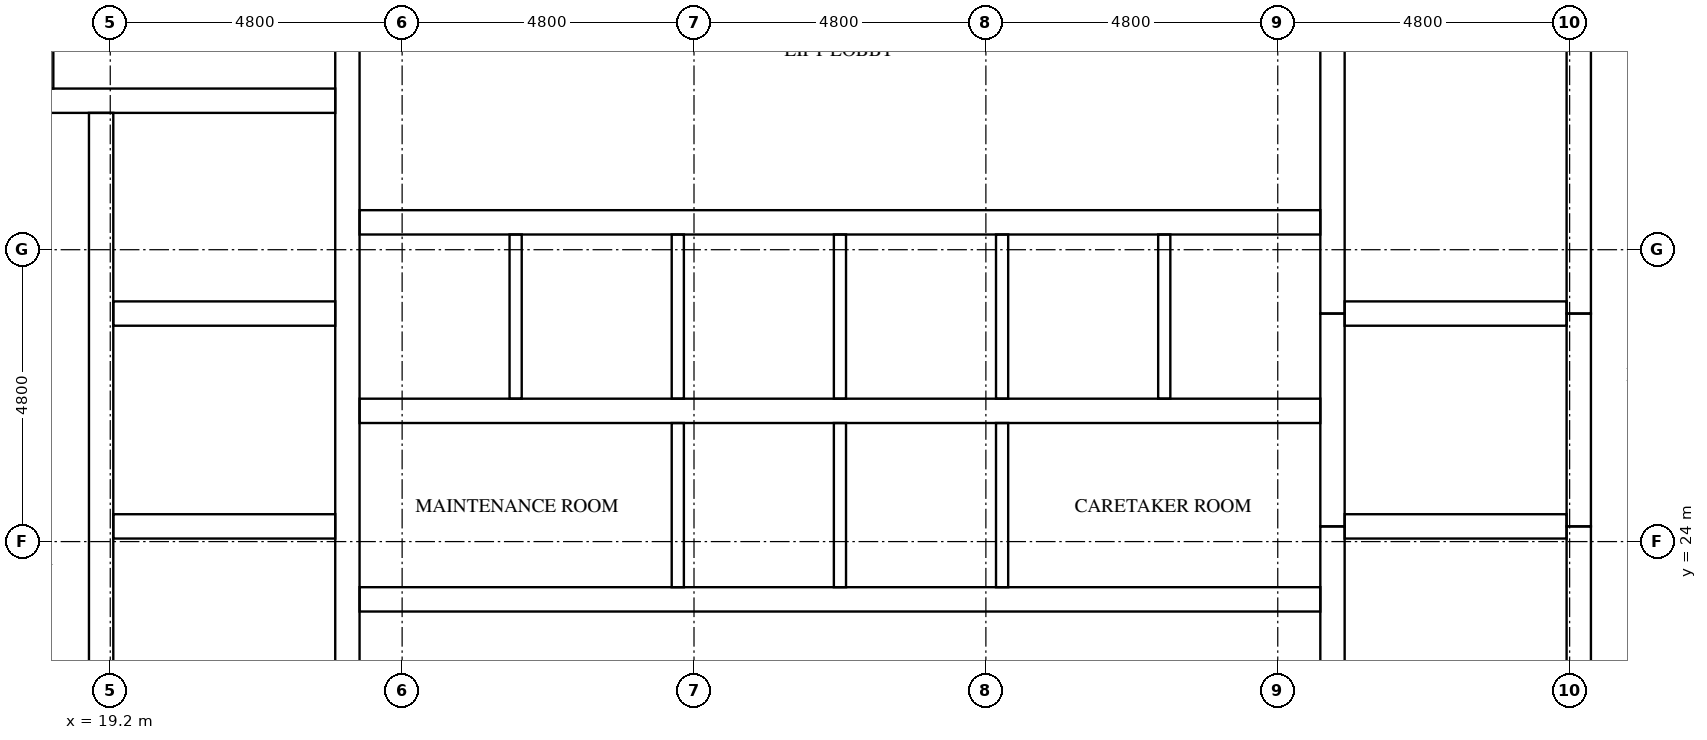
"""IFC4 building model, lengths in metres.
Left out: names, types, materials, properties, quantities, classifications, styles, units other than length and angle.
Written with IfcOpenShell. Run it as: python <this file> out.ifc"""

import sys

from ifc_helpers import new_model, si_unit, direction, frame, frame_2d, origin, place, context, subcontext, project, spatial, rectangle, extrude, element, fill, save


model = new_model("IFC4")
c1 = context("Model", 3, precision=1e-05, world=origin(), true_north=direction((0.0, 1.0)))
c2 = subcontext(c1, "Body", "Model", "MODEL_VIEW")
j1 = project(units=[si_unit("LENGTHUNIT", "METRE"), si_unit("PLANEANGLEUNIT", "RADIAN")], contexts=[c1])
p1 = place(None, origin())
s1 = spatial("IfcSite", under=j1, at=p1, CompositionType="ELEMENT")
p2 = place(p1, origin())
s2 = spatial("IfcBuilding", under=s1, at=p2, CompositionType="ELEMENT")
p3 = place(p2, frame((0.0, 0.0, 275.6)))
s3 = spatial("IfcBuildingStorey", under=s2, at=p3, CompositionType="ELEMENT", Elevation=275.6)
p4 = place(p3, frame((19.05, 15.5, 0.0), z_axis=(0.0, 0.0, 1.0), x_axis=(0.0, 1.0, 0.0)))
e1 = element("IfcWall", 1, at=p4, inside=s3, PredefinedType="SHEAR", context=c2, shape_type="SweptSolid", body=[
    extrude(rectangle(XDim=15.55, YDim=0.4, at=frame_2d((7.775, 0.0))), origin(), (0.0, 0.0, 1.0), 3.2),
])
p5 = place(p4, frame((9.95, 0.0, 0.0)))
e2 = element("IfcOpeningElement", 2, at=p5, cuts=e1, PredefinedType="OPENING", context=c2, shape_type="SweptSolid", body=[
    extrude(rectangle(XDim=1.1, YDim=2.1, at=frame_2d((0.55, 1.05))), frame((0.0, 0.21, 0.0), z_axis=(0.0, -1.0, 0.0), x_axis=(1.0, 0.0, 0.0)), (0.0, 0.0, 1.0), 0.42),
])
p6 = place(p4, frame((13.45, 0.0, 0.0)))
e3 = element("IfcOpeningElement", 3, at=p6, cuts=e1, PredefinedType="OPENING", context=c2, shape_type="SweptSolid", body=[
    extrude(rectangle(XDim=1.1, YDim=2.1, at=frame_2d((0.55, 1.05))), frame((0.0, 0.21, 0.0), z_axis=(0.0, -1.0, 0.0), x_axis=(1.0, 0.0, 0.0)), (0.0, 0.0, 1.0), 0.42),
])
p7 = place(p4, frame((0.7, 0.0, 0.0)))
e4 = element("IfcOpeningElement", 4, at=p7, cuts=e1, PredefinedType="OPENING", context=c2, shape_type="SweptSolid", body=[
    extrude(rectangle(XDim=1.2, YDim=2.1, at=frame_2d((0.6, 1.05))), frame((0.0, 0.21, 0.0), z_axis=(0.0, -1.0, 0.0), x_axis=(1.0, 0.0, 0.0)), (0.0, 0.0, 1.0), 0.42),
])
p8 = place(p3, frame((23.1, 15.5, 0.0), z_axis=(0.0, 0.0, 1.0), x_axis=(0.0, 1.0, 0.0)))
e5 = element("IfcWall", 5, at=p8, inside=s3, PredefinedType="SHEAR", context=c2, shape_type="SweptSolid", body=[
    extrude(rectangle(XDim=21.8, YDim=0.4, at=frame_2d((10.9, 0.0))), origin(), (0.0, 0.0, 1.0), 3.2),
])
p9 = place(p3, frame((39.3, 15.5, 0.0), z_axis=(0.0, 0.0, 1.0), x_axis=(0.0, 1.0, 0.0)))
e6 = element("IfcWall", 6, at=p9, inside=s3, PredefinedType="SHEAR", context=c2, shape_type="SweptSolid", body=[
    extrude(rectangle(XDim=8.75, YDim=0.4, at=frame_2d((4.375, 0.0))), origin(), (0.0, 0.0, 1.0), 3.2),
])
p10 = place(p3, frame((39.3, 24.25, 0.0), z_axis=(0.0, 0.0, 1.0), x_axis=(0.0, 1.0, 0.0)))
e7 = element("IfcWall", 7, at=p10, inside=s3, PredefinedType="SHEAR", context=c2, shape_type="SweptSolid", body=[
    extrude(rectangle(XDim=3.5, YDim=0.4, at=frame_2d((1.75, 0.0))), origin(), (0.0, 0.0, 1.0), 3.2),
])
p11 = place(p3, frame((39.3, 27.75, 0.0), z_axis=(0.0, 0.0, 1.0), x_axis=(0.0, 1.0, 0.0)))
e8 = element("IfcWall", 8, at=p11, inside=s3, PredefinedType="SHEAR", context=c2, shape_type="SweptSolid", body=[
    extrude(rectangle(XDim=9.55, YDim=0.4, at=frame_2d((4.775, 0.0))), origin(), (0.0, 0.0, 1.0), 3.2),
])
p12 = place(p3, frame((43.35, 15.5, 0.0), z_axis=(0.0, 0.0, 1.0), x_axis=(0.0, 1.0, 0.0)))
e9 = element("IfcWall", 9, at=p12, inside=s3, PredefinedType="SHEAR", context=c2, shape_type="SweptSolid", body=[
    extrude(rectangle(XDim=8.75, YDim=0.4, at=frame_2d((4.375, 0.0))), origin(), (0.0, 0.0, 1.0), 3.2),
])
p13 = place(p12, frame((0.7, 0.0, 0.0)))
e10 = element("IfcOpeningElement", 10, at=p13, cuts=e9, PredefinedType="OPENING", context=c2, shape_type="SweptSolid", body=[
    extrude(rectangle(XDim=1.2, YDim=2.1, at=frame_2d((0.6, 1.05))), frame((0.0, 0.21, 0.0), z_axis=(0.0, -1.0, 0.0), x_axis=(1.0, 0.0, 0.0)), (0.0, 0.0, 1.0), 0.42),
])
p14 = place(p3, frame((43.35, 24.25, 0.0), z_axis=(0.0, 0.0, 1.0), x_axis=(0.0, 1.0, 0.0)))
e11 = element("IfcWall", 11, at=p14, inside=s3, PredefinedType="SHEAR", context=c2, shape_type="SweptSolid", body=[
    extrude(rectangle(XDim=3.5, YDim=0.4, at=frame_2d((1.75, 0.0))), origin(), (0.0, 0.0, 1.0), 3.2),
])
p15 = place(p14, frame((1.2, 0.0, 0.0)))
e12 = element("IfcOpeningElement", 12, at=p15, cuts=e11, PredefinedType="OPENING", context=c2, shape_type="SweptSolid", body=[
    extrude(rectangle(XDim=1.1, YDim=2.1, at=frame_2d((0.55, 1.05))), frame((0.0, 0.21, 0.0), z_axis=(0.0, -1.0, 0.0), x_axis=(1.0, 0.0, 0.0)), (0.0, 0.0, 1.0), 0.42),
])
p16 = place(p3, frame((43.35, 27.75, 0.0), z_axis=(0.0, 0.0, 1.0), x_axis=(0.0, 1.0, 0.0)))
e13 = element("IfcWall", 13, at=p16, inside=s3, PredefinedType="SHEAR", context=c2, shape_type="SweptSolid", body=[
    extrude(rectangle(XDim=9.55, YDim=0.4, at=frame_2d((4.775, 0.0))), origin(), (0.0, 0.0, 1.0), 3.2),
])
p17 = place(p16, frame((7.65, 0.0, 0.0)))
e14 = element("IfcOpeningElement", 14, at=p17, cuts=e13, PredefinedType="OPENING", context=c2, shape_type="SweptSolid", body=[
    extrude(rectangle(XDim=1.2, YDim=2.1, at=frame_2d((0.6, 1.05))), frame((0.0, 0.21, 0.0), z_axis=(0.0, -1.0, 0.0), x_axis=(1.0, 0.0, 0.0)), (0.0, 0.0, 1.0), 0.42),
])
for number, where, z_axis, x_axis in (
    (15, (19.25, 24.25, 0.0), (0.0, 0.0, 1.0), (1.0, 0.0, 0.0)),
    (16, (19.25, 27.75, 0.0), (0.0, 0.0, 1.0), (1.0, 0.0, 0.0)),
):
    element("IfcWall", number, at=place(p3, frame(where, z_axis=z_axis, x_axis=x_axis)), inside=s3, PredefinedType="SHEAR", context=c2, shape_type="SweptSolid", body=[
        extrude(rectangle(XDim=3.65, YDim=0.4, at=frame_2d((1.825, 0.0))), origin(), (0.0, 0.0, 1.0), 3.2),
    ])
p18 = place(p3, frame((15.5, 31.25, 0.0), z_axis=(0.0, 0.0, 1.0), x_axis=(1.0, 0.0, 0.0)))
e17 = element("IfcWall", 17, at=p18, inside=s3, PredefinedType="SHEAR", context=c2, shape_type="SweptSolid", body=[
    extrude(rectangle(XDim=7.4, YDim=0.4, at=frame_2d((3.7, 0.0))), origin(), (0.0, 0.0, 1.0), 3.2),
])
for number, where, z_axis, x_axis in (
    (18, (39.5, 24.25, 0.0), (0.0, 0.0, 1.0), (1.0, 0.0, 0.0)),
    (19, (39.5, 27.75, 0.0), (0.0, 0.0, 1.0), (1.0, 0.0, 0.0)),
):
    element("IfcWall", number, at=place(p3, frame(where, z_axis=z_axis, x_axis=x_axis)), inside=s3, PredefinedType="SHEAR", context=c2, shape_type="SweptSolid", body=[
        extrude(rectangle(XDim=3.65, YDim=0.4, at=frame_2d((1.825, 0.0))), origin(), (0.0, 0.0, 1.0), 3.2),
    ])
p19 = place(p3, frame((23.3, 23.05, 0.0), z_axis=(0.0, 0.0, 1.0), x_axis=(1.0, 0.0, 0.0)))
e20 = element("IfcWall", 20, at=p19, inside=s3, PredefinedType="SHEAR", context=c2, shape_type="SweptSolid", body=[
    extrude(rectangle(XDim=15.8, YDim=0.4, at=frame_2d((7.9, 0.0))), origin(), (0.0, 0.0, 1.0), 3.2),
])
p20 = place(p19, frame((2.067, 0.0, 0.0)))
e21 = element("IfcOpeningElement", 21, at=p20, cuts=e20, PredefinedType="OPENING", context=c2, shape_type="SweptSolid", body=[
    extrude(rectangle(XDim=1.0, YDim=2.1, at=frame_2d((0.5, 1.05))), frame((0.0, 0.21, 0.0), z_axis=(0.0, -1.0, 0.0), x_axis=(1.0, 0.0, 0.0)), (0.0, 0.0, 1.0), 0.42),
])
p21 = place(p19, frame((12.733, 0.0, 0.0)))
e22 = element("IfcOpeningElement", 22, at=p21, cuts=e20, PredefinedType="OPENING", context=c2, shape_type="SweptSolid", body=[
    extrude(rectangle(XDim=1.0, YDim=2.1, at=frame_2d((0.5, 1.05))), frame((0.0, 0.21, 0.0), z_axis=(0.0, -1.0, 0.0), x_axis=(1.0, 0.0, 0.0)), (0.0, 0.0, 1.0), 0.42),
])
p22 = place(p3, frame((23.3, 26.15, 0.0), z_axis=(0.0, 0.0, 1.0), x_axis=(1.0, 0.0, 0.0)))
e23 = element("IfcWall", 23, at=p22, inside=s3, PredefinedType="SHEAR", context=c2, shape_type="SweptSolid", body=[
    extrude(rectangle(XDim=15.8, YDim=0.4, at=frame_2d((7.9, 0.0))), origin(), (0.0, 0.0, 1.0), 3.2),
])
p23 = place(p3, frame((23.3, 29.25, 0.0), z_axis=(0.0, 0.0, 1.0), x_axis=(1.0, 0.0, 0.0)))
e24 = element("IfcWall", 24, at=p23, inside=s3, PredefinedType="SHEAR", context=c2, shape_type="SweptSolid", body=[
    extrude(rectangle(XDim=15.8, YDim=0.4, at=frame_2d((7.9, 0.0))), origin(), (0.0, 0.0, 1.0), 3.2),
])
p24 = place(p23, frame((0.683, 0.0, 0.0)))
e25 = element("IfcOpeningElement", 25, at=p24, cuts=e24, PredefinedType="OPENING", context=c2, shape_type="SweptSolid", body=[
    extrude(rectangle(XDim=1.1, YDim=2.1, at=frame_2d((0.55, 1.05))), frame((0.0, 0.21, 0.0), z_axis=(0.0, -1.0, 0.0), x_axis=(1.0, 0.0, 0.0)), (0.0, 0.0, 1.0), 0.42),
])
p25 = place(p23, frame((3.35, 0.0, 0.0)))
e26 = element("IfcOpeningElement", 26, at=p25, cuts=e24, PredefinedType="OPENING", context=c2, shape_type="SweptSolid", body=[
    extrude(rectangle(XDim=1.1, YDim=2.1, at=frame_2d((0.55, 1.05))), frame((0.0, 0.21, 0.0), z_axis=(0.0, -1.0, 0.0), x_axis=(1.0, 0.0, 0.0)), (0.0, 0.0, 1.0), 0.42),
])
p26 = place(p23, frame((6.017, 0.0, 0.0)))
e27 = element("IfcOpeningElement", 27, at=p26, cuts=e24, PredefinedType="OPENING", context=c2, shape_type="SweptSolid", body=[
    extrude(rectangle(XDim=1.1, YDim=2.1, at=frame_2d((0.55, 1.05))), frame((0.0, 0.21, 0.0), z_axis=(0.0, -1.0, 0.0), x_axis=(1.0, 0.0, 0.0)), (0.0, 0.0, 1.0), 0.42),
])
p27 = place(p23, frame((8.683, 0.0, 0.0)))
e28 = element("IfcOpeningElement", 28, at=p27, cuts=e24, PredefinedType="OPENING", context=c2, shape_type="SweptSolid", body=[
    extrude(rectangle(XDim=1.1, YDim=2.1, at=frame_2d((0.55, 1.05))), frame((0.0, 0.21, 0.0), z_axis=(0.0, -1.0, 0.0), x_axis=(1.0, 0.0, 0.0)), (0.0, 0.0, 1.0), 0.42),
])
p28 = place(p23, frame((11.35, 0.0, 0.0)))
e29 = element("IfcOpeningElement", 29, at=p28, cuts=e24, PredefinedType="OPENING", context=c2, shape_type="SweptSolid", body=[
    extrude(rectangle(XDim=1.1, YDim=2.1, at=frame_2d((0.55, 1.05))), frame((0.0, 0.21, 0.0), z_axis=(0.0, -1.0, 0.0), x_axis=(1.0, 0.0, 0.0)), (0.0, 0.0, 1.0), 0.42),
])
p29 = place(p23, frame((14.017, 0.0, 0.0)))
e30 = element("IfcOpeningElement", 30, at=p29, cuts=e24, PredefinedType="OPENING", context=c2, shape_type="SweptSolid", body=[
    extrude(rectangle(XDim=1.1, YDim=2.1, at=frame_2d((0.55, 1.05))), frame((0.0, 0.21, 0.0), z_axis=(0.0, -1.0, 0.0), x_axis=(1.0, 0.0, 0.0)), (0.0, 0.0, 1.0), 0.42),
])
for number, where, z_axis, x_axis in (
    (31, (25.867, 26.35, 0.0), (0.0, 0.0, 1.0), (0.0, 1.0, 0.0)),
    (32, (28.533, 23.25, 0.0), (0.0, 0.0, 1.0), (0.0, 1.0, 0.0)),
    (33, (28.533, 26.35, 0.0), (0.0, 0.0, 1.0), (0.0, 1.0, 0.0)),
    (34, (31.2, 23.25, 0.0), (0.0, 0.0, 1.0), (0.0, 1.0, 0.0)),
    (35, (31.2, 26.35, 0.0), (0.0, 0.0, 1.0), (0.0, 1.0, 0.0)),
    (36, (33.867, 23.25, 0.0), (0.0, 0.0, 1.0), (0.0, 1.0, 0.0)),
    (37, (33.867, 26.35, 0.0), (0.0, 0.0, 1.0), (0.0, 1.0, 0.0)),
    (38, (36.533, 26.35, 0.0), (0.0, 0.0, 1.0), (0.0, 1.0, 0.0)),
):
    element("IfcWall", number, at=place(p3, frame(where, z_axis=z_axis, x_axis=x_axis)), inside=s3, PredefinedType="SOLIDWALL", context=c2, shape_type="SweptSolid", body=[
        extrude(rectangle(XDim=2.7, YDim=0.2, at=frame_2d((1.35, 0.0))), origin(), (0.0, 0.0, 1.0), 3.2),
    ])
p30 = place(p3, frame((18.164, 31.45, 0.0), z_axis=(0.0, 0.0, 1.0), x_axis=(0.0, 1.0, 0.0)))
e39 = element("IfcWall", 39, at=p30, inside=s3, PredefinedType="PARTITIONING", context=c2, shape_type="SweptSolid", body=[
    extrude(rectangle(XDim=5.85, YDim=0.2, at=frame_2d((2.925, 0.0))), origin(), (0.0, 0.0, 1.0), 3.2),
])
p31 = place(p24, origin())
e40 = element("IfcDoor", 40, at=p31, inside=s3, OperationType="DOUBLE_DOOR_SLIDING", PredefinedType="DOOR", context=c2, shape_type="SweptSolid", body=[
    extrude(rectangle(XDim=1.1, YDim=2.1, at=frame_2d((0.55, 1.05))), frame((0.0, 0.025, 0.0), z_axis=(0.0, -1.0, 0.0), x_axis=(1.0, 0.0, 0.0)), (0.0, 0.0, 1.0), 0.05),
])
fill(e25, e40)
p32 = place(p25, origin())
e41 = element("IfcDoor", 41, at=p32, inside=s3, OperationType="DOUBLE_DOOR_SLIDING", PredefinedType="DOOR", context=c2, shape_type="SweptSolid", body=[
    extrude(rectangle(XDim=1.1, YDim=2.1, at=frame_2d((0.55, 1.05))), frame((0.0, 0.025, 0.0), z_axis=(0.0, -1.0, 0.0), x_axis=(1.0, 0.0, 0.0)), (0.0, 0.0, 1.0), 0.05),
])
fill(e26, e41)
p33 = place(p26, origin())
e42 = element("IfcDoor", 42, at=p33, inside=s3, OperationType="DOUBLE_DOOR_SLIDING", PredefinedType="DOOR", context=c2, shape_type="SweptSolid", body=[
    extrude(rectangle(XDim=1.1, YDim=2.1, at=frame_2d((0.55, 1.05))), frame((0.0, 0.025, 0.0), z_axis=(0.0, -1.0, 0.0), x_axis=(1.0, 0.0, 0.0)), (0.0, 0.0, 1.0), 0.05),
])
fill(e27, e42)
p34 = place(p27, origin())
e43 = element("IfcDoor", 43, at=p34, inside=s3, OperationType="DOUBLE_DOOR_SLIDING", PredefinedType="DOOR", context=c2, shape_type="SweptSolid", body=[
    extrude(rectangle(XDim=1.1, YDim=2.1, at=frame_2d((0.55, 1.05))), frame((0.0, 0.025, 0.0), z_axis=(0.0, -1.0, 0.0), x_axis=(1.0, 0.0, 0.0)), (0.0, 0.0, 1.0), 0.05),
])
fill(e28, e43)
p35 = place(p28, origin())
e44 = element("IfcDoor", 44, at=p35, inside=s3, OperationType="DOUBLE_DOOR_SLIDING", PredefinedType="DOOR", context=c2, shape_type="SweptSolid", body=[
    extrude(rectangle(XDim=1.1, YDim=2.1, at=frame_2d((0.55, 1.05))), frame((0.0, 0.025, 0.0), z_axis=(0.0, -1.0, 0.0), x_axis=(1.0, 0.0, 0.0)), (0.0, 0.0, 1.0), 0.05),
])
fill(e29, e44)
p36 = place(p29, origin())
e45 = element("IfcDoor", 45, at=p36, inside=s3, OperationType="DOUBLE_DOOR_SLIDING", PredefinedType="DOOR", context=c2, shape_type="SweptSolid", body=[
    extrude(rectangle(XDim=1.1, YDim=2.1, at=frame_2d((0.55, 1.05))), frame((0.0, 0.025, 0.0), z_axis=(0.0, -1.0, 0.0), x_axis=(1.0, 0.0, 0.0)), (0.0, 0.0, 1.0), 0.05),
])
fill(e30, e45)
p37 = place(p5, origin())
e46 = element("IfcDoor", 46, at=p37, inside=s3, OperationType="DOUBLE_DOOR_SLIDING", PredefinedType="DOOR", context=c2, shape_type="SweptSolid", body=[
    extrude(rectangle(XDim=1.1, YDim=2.1, at=frame_2d((0.55, 1.05))), frame((0.0, 0.025, 0.0), z_axis=(0.0, -1.0, 0.0), x_axis=(1.0, 0.0, 0.0)), (0.0, 0.0, 1.0), 0.05),
])
fill(e2, e46)
p38 = place(p6, origin())
e47 = element("IfcDoor", 47, at=p38, inside=s3, OperationType="DOUBLE_DOOR_SLIDING", PredefinedType="DOOR", context=c2, shape_type="SweptSolid", body=[
    extrude(rectangle(XDim=1.1, YDim=2.1, at=frame_2d((0.55, 1.05))), frame((0.0, 0.025, 0.0), z_axis=(0.0, -1.0, 0.0), x_axis=(1.0, 0.0, 0.0)), (0.0, 0.0, 1.0), 0.05),
])
fill(e3, e47)
p39 = place(p15, origin())
e48 = element("IfcDoor", 48, at=p39, inside=s3, OperationType="DOUBLE_DOOR_SLIDING", PredefinedType="DOOR", context=c2, shape_type="SweptSolid", body=[
    extrude(rectangle(XDim=1.1, YDim=2.1, at=frame_2d((0.55, 1.05))), frame((0.0, 0.025, 0.0), z_axis=(0.0, -1.0, 0.0), x_axis=(1.0, 0.0, 0.0)), (0.0, 0.0, 1.0), 0.05),
])
fill(e12, e48)
p40 = place(p20, frame((1.0, 0.0, 0.0), z_axis=(0.0, 0.0, 1.0), x_axis=(-1.0, 0.0, 0.0)))
e49 = element("IfcDoor", 49, at=p40, inside=s3, OperationType="SINGLE_SWING_LEFT", PredefinedType="DOOR", context=c2, shape_type="SweptSolid", body=[
    extrude(rectangle(XDim=1.0, YDim=2.1, at=frame_2d((0.5, 1.05))), frame((0.0, 0.025, 0.0), z_axis=(0.0, -1.0, 0.0), x_axis=(1.0, 0.0, 0.0)), (0.0, 0.0, 1.0), 0.05),
])
fill(e21, e49)
p41 = place(p21, frame((1.0, 0.0, 0.0), z_axis=(0.0, 0.0, 1.0), x_axis=(-1.0, 0.0, 0.0)))
e50 = element("IfcDoor", 50, at=p41, inside=s3, OperationType="SINGLE_SWING_RIGHT", PredefinedType="DOOR", context=c2, shape_type="SweptSolid", body=[
    extrude(rectangle(XDim=1.0, YDim=2.1, at=frame_2d((0.5, 1.05))), frame((0.0, 0.025, 0.0), z_axis=(0.0, -1.0, 0.0), x_axis=(1.0, 0.0, 0.0)), (0.0, 0.0, 1.0), 0.05),
])
fill(e22, e50)
save(model, sys.argv[1])
